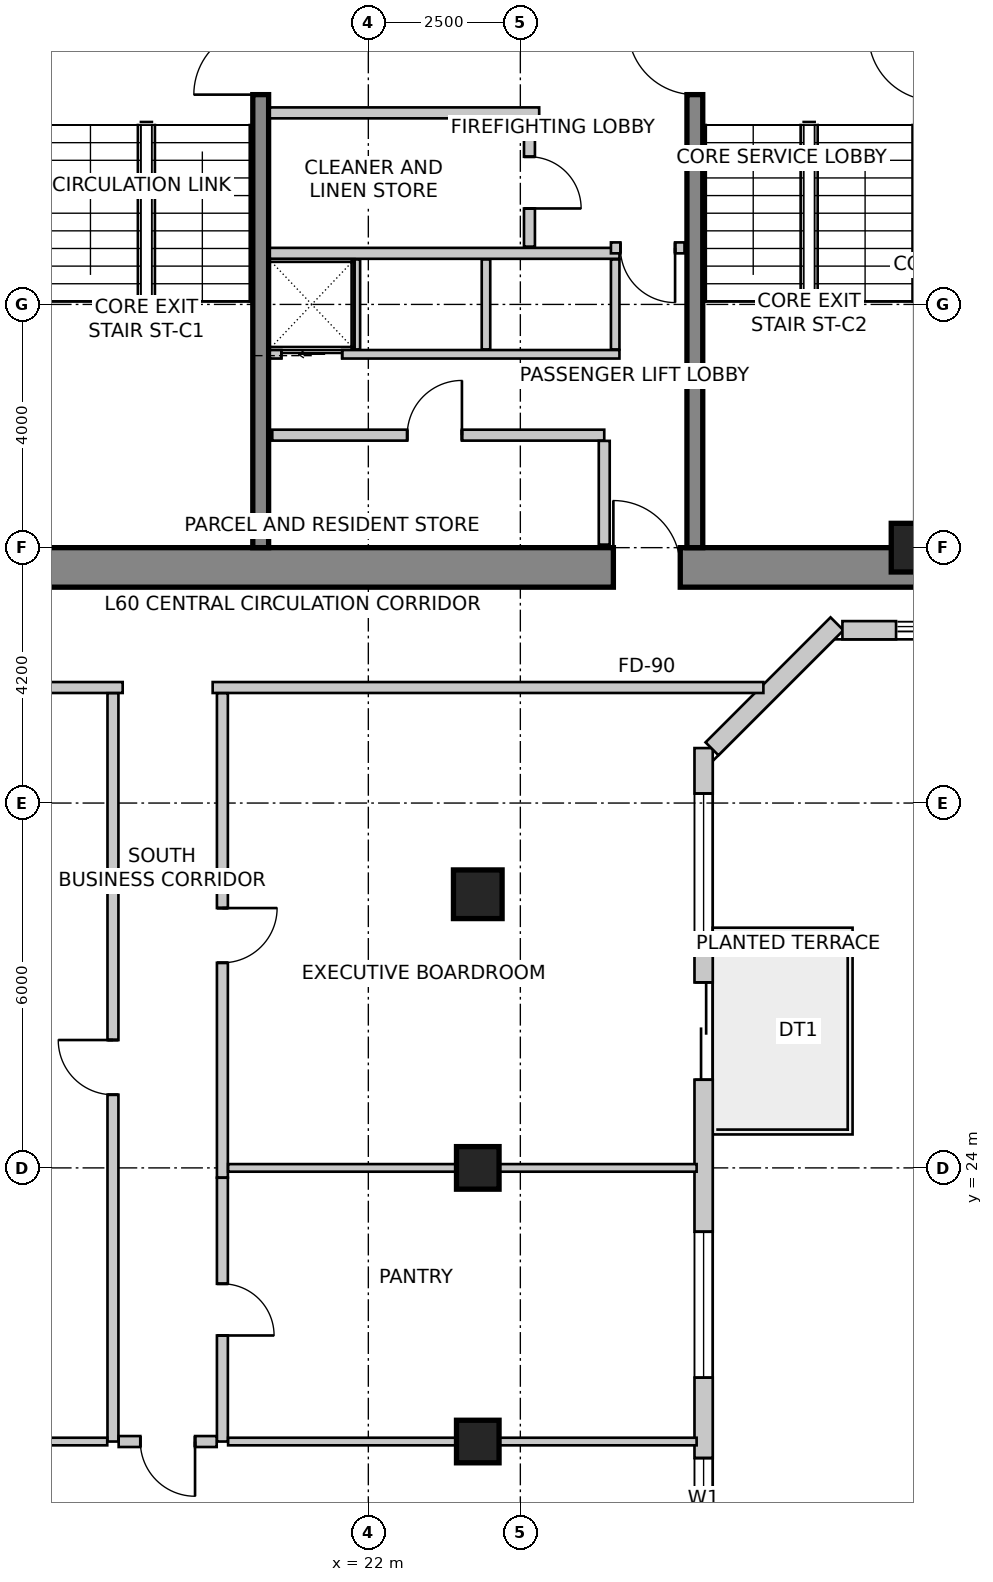
"""IFC4 building model, lengths in metres.
Left out: names, types, materials, properties, quantities, classifications, styles, units other than length and angle.
Written with IfcOpenShell. Run it as: python <this file> out.ifc"""

import sys

from ifc_helpers import new_model, si_unit, direction, frame, frame_2d, origin, origin_2d, place, context, subcontext, project, spatial, rectangle, extrude, source, transform, mapped, element, fill, save


model = new_model("IFC4")
c1 = context("Model", 3, precision=1e-05, world=origin(), true_north=direction((0.0, 1.0)))
c2 = subcontext(c1, "Body", "Model", "MODEL_VIEW")
j1 = project(units=[si_unit("LENGTHUNIT", "METRE"), si_unit("PLANEANGLEUNIT", "RADIAN")], contexts=[c1])
p1 = place(None, origin())
s1 = spatial("IfcSite", under=j1, at=p1, CompositionType="ELEMENT")
p2 = place(p1, origin())
s2 = spatial("IfcBuilding", under=s1, at=p2, CompositionType="ELEMENT")
p3 = place(p2, frame((0.0, 0.0, 235.9)))
s3 = spatial("IfcBuildingStorey", under=s2, at=p3, CompositionType="ELEMENT", Elevation=235.9)
p4 = place(p3, frame((15.95, 33.875, 0.0), z_axis=(0.0, 0.0, 1.0), x_axis=(1.0, 0.0, 0.0)))
e1 = element("IfcWall", 1, at=p4, inside=s3, PredefinedType="SHEAR", context=c2, shape_type="SweptSolid", body=[
    extrude(rectangle(XDim=15.7, YDim=0.65, at=frame_2d((7.85, 0.0))), origin(), (0.0, 0.0, 1.0), 3.5),
])
m1 = source(origin(), c2, "Body", "SweptSolid", [
    extrude(rectangle(XDim=1.1, YDim=2.15, at=frame_2d((0.55, 1.075))), frame((0.0, 0.335, 0.0), z_axis=(0.0, -1.0, 0.0), x_axis=(1.0, 0.0, 0.0)), (0.0, 0.0, 1.0), 0.67),
])
p5 = place(p4, frame((10.08, 0.0, 0.0)))
e2 = element("IfcOpeningElement", 2, at=p5, cuts=e1, PredefinedType="OPENING", context=c2, shape_type="MappedRepresentation", body=[
    mapped(m1, transform((0.0, 0.0, 0.0), scale=1.0)),
])
p6 = place(p3, frame((20.23, 34.2, 0.0), z_axis=(0.0, 0.0, 1.0), x_axis=(0.0, 1.0, 0.0)))
e3 = element("IfcWall", 3, at=p6, inside=s3, PredefinedType="SHEAR", context=c2, shape_type="SweptSolid", body=[
    extrude(rectangle(XDim=9.06, YDim=0.26, at=frame_2d((4.53, 0.0))), origin(), (0.0, 0.0, 1.0), 3.5),
])
m2 = source(origin(), c2, "Body", "SweptSolid", [
    extrude(rectangle(XDim=1.1, YDim=2.15, at=frame_2d((0.55, 1.075))), frame((0.0, 0.14, 0.0), z_axis=(0.0, -1.0, 0.0), x_axis=(1.0, 0.0, 0.0)), (0.0, 0.0, 1.0), 0.28),
])
p7 = place(p6, frame((7.45, 0.0, 0.0)))
e4 = element("IfcOpeningElement", 4, at=p7, cuts=e3, PredefinedType="OPENING", context=c2, shape_type="MappedRepresentation", body=[
    mapped(m2, transform((0.0, 0.0, 0.0), scale=1.0)),
])
p8 = place(p3, frame((27.37, 34.2, 0.0), z_axis=(0.0, 0.0, 1.0), x_axis=(0.0, 1.0, 0.0)))
e5 = element("IfcWall", 5, at=p8, inside=s3, PredefinedType="SHEAR", context=c2, shape_type="SweptSolid", body=[
    extrude(rectangle(XDim=9.06, YDim=0.26, at=frame_2d((4.53, 0.0))), origin(), (0.0, 0.0, 1.0), 3.5),
])
p9 = place(p8, frame((7.45, 0.0, 0.0)))
e6 = element("IfcOpeningElement", 6, at=p9, cuts=e5, PredefinedType="OPENING", context=c2, shape_type="MappedRepresentation", body=[
    mapped(m2, transform((0.0, 0.0, 0.0), scale=1.0)),
])
m3 = source(origin(), c2, "Body", "SweptSolid", [
    extrude(rectangle(XDim=0.8, YDim=0.8, at=origin_2d()), origin(), (0.0, 0.0, 1.0), 3.5),
])
for number, where, z_axis, x_axis in (
    (7, (31.0, 34.2, 0.0), (0.0, 0.0, 1.0), (1.0, 0.0, 0.0)),
    (8, (23.8, 28.5, 0.0), (0.0, 0.0, 1.0), (1.0, 0.0, 0.0)),
):
    element("IfcColumn", number, at=place(p3, frame(where, z_axis=z_axis, x_axis=x_axis)), inside=s3, PredefinedType="COLUMN", context=c2, shape_type="MappedRepresentation", body=[
        mapped(m3, transform((0.0, 0.0, 0.0), scale=1.0)),
    ])
m4 = source(origin(), c2, "Body", "SweptSolid", [
    extrude(rectangle(XDim=0.7, YDim=0.7, at=origin_2d()), origin(), (0.0, 0.0, 1.0), 3.5),
])
for number, where, z_axis, x_axis in (
    (9, (23.8, 24.0, 0.0), (0.0, 0.0, 1.0), (1.0, 0.0, 0.0)),
    (10, (23.8, 19.5, 0.0), (0.0, 0.0, 1.0), (1.0, 0.0, 0.0)),
):
    element("IfcColumn", number, at=place(p3, frame(where, z_axis=z_axis, x_axis=x_axis)), inside=s3, PredefinedType="COLUMN", context=c2, shape_type="MappedRepresentation", body=[
        mapped(m4, transform((0.0, 0.0, 0.0), scale=1.0)),
    ])
p10 = place(p3, frame((27.514, 16.457, 0.0), z_axis=(0.0, 0.0, 1.0), x_axis=(0.0, 1.0, 0.0)))
e11 = element("IfcWall", 11, at=p10, inside=s3, PredefinedType="SOLIDWALL", context=c2, shape_type="SweptSolid", body=[
    extrude(rectangle(XDim=14.447, YDim=0.3, at=frame_2d((7.223, 0.0))), origin(), (0.0, 0.0, 1.0), 3.25),
])
m5 = source(origin(), c2, "Body", "SweptSolid", [
    extrude(rectangle(XDim=1.6, YDim=2.15, at=frame_2d((0.8, 1.075))), frame((0.0, 0.16, 0.0), z_axis=(0.0, -1.0, 0.0), x_axis=(1.0, 0.0, 0.0)), (0.0, 0.0, 1.0), 0.32),
])
p11 = place(p10, frame((8.993, 0.0, 0.0)))
e12 = element("IfcOpeningElement", 12, at=p11, cuts=e11, PredefinedType="OPENING", context=c2, shape_type="MappedRepresentation", body=[
    mapped(m5, transform((0.0, 0.0, 0.0), scale=1.0)),
])
m6 = source(origin(), c2, "Body", "SweptSolid", [
    extrude(rectangle(XDim=2.4, YDim=2.2, at=frame_2d((1.2, 1.1))), frame((0.0, 0.16, 0.0), z_axis=(0.0, -1.0, 0.0), x_axis=(1.0, 0.0, 0.0)), (0.0, 0.0, 1.0), 0.32),
])
p12 = place(p10, frame((0.371, 0.0, 0.85)))
e13 = element("IfcOpeningElement", 13, at=p12, cuts=e11, PredefinedType="OPENING", context=c2, shape_type="MappedRepresentation", body=[
    mapped(m6, transform((0.0, 0.0, 0.0), scale=1.0)),
])
p13 = place(p10, frame((4.093, 0.0, 0.85)))
e14 = element("IfcOpeningElement", 14, at=p13, cuts=e11, PredefinedType="OPENING", context=c2, shape_type="MappedRepresentation", body=[
    mapped(m6, transform((0.0, 0.0, 0.0), scale=1.0)),
])
p14 = place(p10, frame((11.3, 0.0, 0.85)))
e15 = element("IfcOpeningElement", 15, at=p14, cuts=e11, PredefinedType="OPENING", context=c2, shape_type="MappedRepresentation", body=[
    mapped(m6, transform((0.0, 0.0, 0.0), scale=1.0)),
])
p15 = place(p3, frame((27.652, 30.892, 0.0), z_axis=(0.0, 0.0, 1.0), x_axis=(0.707106781187, 0.707106781187, 0.0)))
e16 = element("IfcWall", 16, at=p15, inside=s3, PredefinedType="SOLIDWALL", context=c2, shape_type="SweptSolid", body=[
    extrude(rectangle(XDim=2.907, YDim=0.3, at=frame_2d((1.454, 0.0))), origin(), (0.0, 0.0, 1.0), 3.25),
])
p16 = place(p3, frame((29.797, 32.842, 0.0), z_axis=(0.0, 0.0, 1.0), x_axis=(1.0, 0.0, 0.0)))
e17 = element("IfcWall", 17, at=p16, inside=s3, PredefinedType="SOLIDWALL", context=c2, shape_type="SweptSolid", body=[
    extrude(rectangle(XDim=0.882, YDim=0.3, at=frame_2d((0.441, 0.0))), origin(), (0.0, 0.0, 1.0), 3.25),
])
p17 = place(p3, frame((20.38, 37.38, 0.0), z_axis=(0.0, 0.0, 1.0), x_axis=(1.0, 0.0, 0.0)))
e18 = element("IfcWall", 18, at=p17, inside=s3, PredefinedType="SOLIDWALL", context=c2, shape_type="SweptSolid", body=[
    extrude(rectangle(XDim=5.75, YDim=0.14, at=frame_2d((2.875, 0.0))), origin(), (0.0, 0.0, 1.0), 3.25),
])
m7 = source(origin(), c2, "Body", "SweptSolid", [
    extrude(rectangle(XDim=1.0, YDim=2.15, at=frame_2d((0.5, 1.075))), frame((0.0, 0.08, 0.0), z_axis=(0.0, -1.0, 0.0), x_axis=(1.0, 0.0, 0.0)), (0.0, 0.0, 1.0), 0.16),
])
p18 = place(p17, frame((0.19, 0.0, 0.0)))
e19 = element("IfcOpeningElement", 19, at=p18, cuts=e18, PredefinedType="OPENING", context=c2, shape_type="MappedRepresentation", body=[
    mapped(m7, transform((0.0, 0.0, 0.0), scale=1.0)),
])
p19 = place(p3, frame((20.38, 39.04, 0.0), z_axis=(0.0, 0.0, 1.0), x_axis=(1.0, 0.0, 0.0)))
e20 = element("IfcWall", 20, at=p19, inside=s3, PredefinedType="SOLIDWALL", context=c2, shape_type="SweptSolid", body=[
    extrude(rectangle(XDim=5.75, YDim=0.18, at=frame_2d((2.875, 0.0))), origin(), (0.0, 0.0, 1.0), 3.25),
])
for number, where, z_axis, x_axis in (
    (21, (26.06, 37.46, 0.0), (0.0, 0.0, 1.0), (0.0, 1.0, 0.0)),
    (22, (21.795, 37.46, 0.0), (0.0, 0.0, 1.0), (0.0, 1.0, 0.0)),
    (23, (23.935, 37.46, 0.0), (0.0, 0.0, 1.0), (0.0, 1.0, 0.0)),
):
    element("IfcWall", number, at=place(p3, frame(where, z_axis=z_axis, x_axis=x_axis)), inside=s3, PredefinedType="SOLIDWALL", context=c2, shape_type="SweptSolid", body=[
        extrude(rectangle(XDim=1.48, YDim=0.14, at=frame_2d((0.74, 0.0))), origin(), (0.0, 0.0, 1.0), 3.25),
    ])
p20 = place(p3, frame((24.81, 41.35, 0.0), z_axis=(0.0, 0.0, 1.0), x_axis=(-1.0, 0.0, 0.0)))
e24 = element("IfcWall", 24, at=p20, inside=s3, PredefinedType="PARTITIONING", context=c2, shape_type="SweptSolid", body=[
    extrude(rectangle(XDim=4.43, YDim=0.18, at=frame_2d((2.215, 0.0))), origin(), (0.0, 0.0, 1.0), 3.25),
])
p21 = place(p3, frame((24.65, 41.256, 0.0), z_axis=(0.0, 0.0, 1.0), x_axis=(0.0, -1.0, 0.0)))
e25 = element("IfcWall", 25, at=p21, inside=s3, PredefinedType="PARTITIONING", context=c2, shape_type="SweptSolid", body=[
    extrude(rectangle(XDim=2.106, YDim=0.18, at=frame_2d((1.053, 0.0))), origin(), (0.0, 0.0, 1.0), 3.25),
])
m8 = source(origin(), c2, "Body", "SweptSolid", [
    extrude(rectangle(XDim=0.85, YDim=2.15, at=frame_2d((0.425, 1.075))), frame((0.0, 0.1, 0.0), z_axis=(0.0, -1.0, 0.0), x_axis=(1.0, 0.0, 0.0)), (0.0, 0.0, 1.0), 0.2),
])
p22 = place(p21, frame((0.628, 0.0, 0.0)))
e26 = element("IfcOpeningElement", 26, at=p22, cuts=e25, PredefinedType="OPENING", context=c2, shape_type="MappedRepresentation", body=[
    mapped(m8, transform((0.0, 0.0, 0.0), scale=1.0)),
])
p23 = place(p3, frame((27.2, 39.13, 0.0), z_axis=(0.0, 0.0, 1.0), x_axis=(-1.0, 0.0, 0.0)))
e27 = element("IfcWall", 27, at=p23, inside=s3, PredefinedType="PARTITIONING", context=c2, shape_type="SweptSolid", body=[
    extrude(rectangle(XDim=1.21, YDim=0.18, at=frame_2d((0.605, 0.0))), origin(), (0.0, 0.0, 1.0), 3.25),
])
m9 = source(origin(), c2, "Body", "SweptSolid", [
    extrude(rectangle(XDim=0.9, YDim=2.15, at=frame_2d((0.45, 1.075))), frame((0.0, 0.1, 0.0), z_axis=(0.0, -1.0, 0.0), x_axis=(1.0, 0.0, 0.0)), (0.0, 0.0, 1.0), 0.2),
])
p24 = place(p23, frame((0.155, 0.0, 0.0)))
e28 = element("IfcOpeningElement", 28, at=p24, cuts=e27, PredefinedType="OPENING", context=c2, shape_type="MappedRepresentation", body=[
    mapped(m9, transform((0.0, 0.0, 0.0), scale=1.0)),
])
p25 = place(p3, frame((20.42, 36.05, 0.0), z_axis=(0.0, 0.0, 1.0), x_axis=(1.0, 0.0, 0.0)))
e29 = element("IfcWall", 29, at=p25, inside=s3, PredefinedType="PARTITIONING", context=c2, shape_type="SweptSolid", body=[
    extrude(rectangle(XDim=5.46, YDim=0.18, at=frame_2d((2.73, 0.0))), origin(), (0.0, 0.0, 1.0), 3.25),
])
p26 = place(p25, frame((2.219, 0.0, 0.0)))
e30 = element("IfcOpeningElement", 30, at=p26, cuts=e29, PredefinedType="OPENING", context=c2, shape_type="MappedRepresentation", body=[
    mapped(m9, transform((0.0, 0.0, 0.0), scale=1.0)),
])
p27 = place(p3, frame((25.88, 35.956, 0.0), z_axis=(0.0, 0.0, 1.0), x_axis=(0.0, -1.0, 0.0)))
e31 = element("IfcWall", 31, at=p27, inside=s3, PredefinedType="PARTITIONING", context=c2, shape_type="SweptSolid", body=[
    extrude(rectangle(XDim=1.706, YDim=0.18, at=frame_2d((0.853, 0.0))), origin(), (0.0, 0.0, 1.0), 2.542),
])
p28 = place(p3, frame((17.96, 31.9, 0.0), z_axis=(0.0, 0.0, 1.0), x_axis=(-1.0, 0.0, 0.0)))
e32 = element("IfcWall", 32, at=p28, inside=s3, PredefinedType="PARTITIONING", context=c2, shape_type="SweptSolid", body=[
    extrude(rectangle(XDim=5.366, YDim=0.18, at=frame_2d((2.683, 0.0))), origin(), (0.0, 0.0, 1.0), 2.835),
])
p29 = place(p3, frame((28.497, 31.9, 0.0), z_axis=(0.0, 0.0, 1.0), x_axis=(-1.0, 0.0, 0.0)))
e33 = element("IfcWall", 33, at=p29, inside=s3, PredefinedType="PARTITIONING", context=c2, shape_type="SweptSolid", body=[
    extrude(rectangle(XDim=9.057, YDim=0.18, at=frame_2d((4.529, 0.0))), origin(), (0.0, 0.0, 1.0), 2.835),
])
p30 = place(p3, frame((17.8, 19.5, 0.0), z_axis=(0.0, 0.0, 1.0), x_axis=(0.0, 1.0, 0.0)))
e34 = element("IfcWall", 34, at=p30, inside=s3, PredefinedType="PARTITIONING", context=c2, shape_type="SweptSolid", body=[
    extrude(rectangle(XDim=12.306, YDim=0.18, at=frame_2d((6.153, 0.0))), origin(), (0.0, 0.0, 1.0), 2.688),
])
p31 = place(p30, frame((5.703, 0.0, 0.0)))
e35 = element("IfcOpeningElement", 35, at=p31, cuts=e34, PredefinedType="OPENING", context=c2, shape_type="MappedRepresentation", body=[
    mapped(m9, transform((0.0, 0.0, 0.0), scale=1.0)),
])
p32 = place(p3, frame((19.6, 31.806, 0.0), z_axis=(0.0, 0.0, 1.0), x_axis=(0.0, -1.0, 0.0)))
e36 = element("IfcWall", 36, at=p32, inside=s3, PredefinedType="PARTITIONING", context=c2, shape_type="SweptSolid", body=[
    extrude(rectangle(XDim=7.966, YDim=0.18, at=frame_2d((3.983, 0.0))), origin(), (0.0, 0.0, 1.0), 2.688),
])
p33 = place(p32, frame((3.533, 0.0, 0.0)))
e37 = element("IfcOpeningElement", 37, at=p33, cuts=e36, PredefinedType="OPENING", context=c2, shape_type="MappedRepresentation", body=[
    mapped(m9, transform((0.0, 0.0, 0.0), scale=1.0)),
])
p34 = place(p3, frame((19.6, 23.838, 0.0), z_axis=(0.0, 0.0, 1.0), x_axis=(0.0, -1.0, 0.0)))
e38 = element("IfcWall", 38, at=p34, inside=s3, PredefinedType="PARTITIONING", context=c2, shape_type="SweptSolid", body=[
    extrude(rectangle(XDim=4.338, YDim=0.18, at=frame_2d((2.169, 0.0))), origin(), (0.0, 0.0, 1.0), 2.688),
])
p35 = place(p34, frame((1.744, 0.0, 0.0)))
e39 = element("IfcOpeningElement", 39, at=p35, cuts=e38, PredefinedType="OPENING", context=c2, shape_type="MappedRepresentation", body=[
    mapped(m8, transform((0.0, 0.0, 0.0), scale=1.0)),
])
p36 = place(p3, frame((19.506, 19.5, 0.0), z_axis=(0.0, 0.0, 1.0), x_axis=(-1.0, 0.0, 0.0)))
e40 = element("IfcWall", 40, at=p36, inside=s3, PredefinedType="PARTITIONING", context=c2, shape_type="SweptSolid", body=[
    extrude(rectangle(XDim=1.612, YDim=0.18, at=frame_2d((0.806, 0.0))), origin(), (0.0, 0.0, 1.0), 3.25),
])
p37 = place(p36, frame((0.356, 0.0, 0.0)))
e41 = element("IfcOpeningElement", 41, at=p37, cuts=e40, PredefinedType="OPENING", context=c2, shape_type="MappedRepresentation", body=[
    mapped(m9, transform((0.0, 0.0, 0.0), scale=1.0)),
])
p38 = place(p3, frame((17.706, 19.5, 0.0), z_axis=(0.0, 0.0, 1.0), x_axis=(-1.0, 0.0, 0.0)))
e42 = element("IfcWall", 42, at=p38, inside=s3, PredefinedType="PARTITIONING", context=c2, shape_type="SweptSolid", body=[
    extrude(rectangle(XDim=6.853, YDim=0.125, at=frame_2d((3.427, 0.0))), origin(), (0.0, 0.0, 1.0), 3.25),
])
for number, where, z_axis, x_axis in (
    (43, (27.399, 24.0, 0.0), (0.0, 0.0, 1.0), (-1.0, 0.0, 0.0)),
    (44, (27.399, 19.5, 0.0), (0.0, 0.0, 1.0), (-1.0, 0.0, 0.0)),
):
    element("IfcWall", number, at=place(p3, frame(where, z_axis=z_axis, x_axis=x_axis)), inside=s3, PredefinedType="PARTITIONING", context=c2, shape_type="SweptSolid", body=[
        extrude(rectangle(XDim=7.705, YDim=0.125, at=frame_2d((3.853, 0.0))), origin(), (0.0, 0.0, 1.0), 2.542),
    ])
m10 = source(origin(), c2, "Body", "SweptSolid", [
    extrude(rectangle(XDim=1.6, YDim=2.15, at=frame_2d((0.8, 1.075))), frame((0.0, 0.025, 0.0), z_axis=(0.0, -1.0, 0.0), x_axis=(1.0, 0.0, 0.0)), (0.0, 0.0, 1.0), 0.05),
])
p39 = place(p11, origin())
e45 = element("IfcDoor", 45, at=p39, inside=s3, OperationType="DOUBLE_DOOR_SLIDING", PredefinedType="DOOR", context=c2, shape_type="MappedRepresentation", body=[
    mapped(m10, transform((0.0, 0.0, 0.0), scale=1.0)),
])
fill(e12, e45)
m11 = source(origin(), c2, "Body", "SweptSolid", [
    extrude(rectangle(XDim=2.4, YDim=2.2, at=frame_2d((1.2, 1.1))), frame((0.0, -0.015, 0.0), z_axis=(0.0, -1.0, 0.0), x_axis=(1.0, 0.0, 0.0)), (0.0, 0.0, 1.0), 0.06),
])
p40 = place(p12, origin())
e46 = element("IfcWindow", 46, at=p40, inside=s3, PartitioningType="SINGLE_PANEL", PredefinedType="WINDOW", context=c2, shape_type="MappedRepresentation", body=[
    mapped(m11, transform((0.0, 0.0, 0.0), scale=1.0)),
])
fill(e13, e46)
p41 = place(p13, origin())
e47 = element("IfcWindow", 47, at=p41, inside=s3, PartitioningType="SINGLE_PANEL", PredefinedType="WINDOW", context=c2, shape_type="MappedRepresentation", body=[
    mapped(m11, transform((0.0, 0.0, 0.0), scale=1.0)),
])
fill(e14, e47)
p42 = place(p14, origin())
e48 = element("IfcWindow", 48, at=p42, inside=s3, PartitioningType="SINGLE_PANEL", PredefinedType="WINDOW", context=c2, shape_type="MappedRepresentation", body=[
    mapped(m11, transform((0.0, 0.0, 0.0), scale=1.0)),
])
fill(e15, e48)
m12 = source(origin(), c2, "Body", "SweptSolid", [
    extrude(rectangle(XDim=1.0, YDim=2.15, at=frame_2d((0.5, 1.075))), frame((0.0, 0.025, 0.0), z_axis=(0.0, -1.0, 0.0), x_axis=(1.0, 0.0, 0.0)), (0.0, 0.0, 1.0), 0.05),
])
p43 = place(p18, origin())
e49 = element("IfcDoor", 49, at=p43, inside=s3, OperationType="SLIDING_TO_LEFT", PredefinedType="DOOR", context=c2, shape_type="MappedRepresentation", body=[
    mapped(m12, transform((0.0, 0.0, 0.0), scale=1.0)),
])
fill(e19, e49)
m13 = source(origin(), c2, "Body", "SweptSolid", [
    extrude(rectangle(XDim=1.1, YDim=2.15, at=frame_2d((0.55, 1.075))), frame((0.0, 0.025, 0.0), z_axis=(0.0, -1.0, 0.0), x_axis=(1.0, 0.0, 0.0)), (0.0, 0.0, 1.0), 0.05),
])
p44 = place(p7, origin())
e50 = element("IfcDoor", 50, at=p44, inside=s3, OperationType="SINGLE_SWING_LEFT", PredefinedType="DOOR", context=c2, shape_type="MappedRepresentation", body=[
    mapped(m13, transform((0.0, 0.0, 0.0), scale=1.0)),
])
fill(e4, e50)
p45 = place(p9, origin())
e51 = element("IfcDoor", 51, at=p45, inside=s3, OperationType="SINGLE_SWING_RIGHT", PredefinedType="DOOR", context=c2, shape_type="MappedRepresentation", body=[
    mapped(m13, transform((0.0, 0.0, 0.0), scale=1.0)),
])
fill(e6, e51)
p46 = place(p5, origin())
e52 = element("IfcDoor", 52, at=p46, inside=s3, OperationType="SINGLE_SWING_LEFT", PredefinedType="DOOR", context=c2, shape_type="MappedRepresentation", body=[
    mapped(m13, transform((0.0, 0.0, 0.0), scale=1.0)),
])
fill(e2, e52)
m14 = source(origin(), c2, "Body", "SweptSolid", [
    extrude(rectangle(XDim=0.85, YDim=2.15, at=frame_2d((0.425, 1.075))), frame((0.0, 0.025, 0.0), z_axis=(0.0, -1.0, 0.0), x_axis=(1.0, 0.0, 0.0)), (0.0, 0.0, 1.0), 0.05),
])
p47 = place(p22, origin())
e53 = element("IfcDoor", 53, at=p47, inside=s3, OperationType="SINGLE_SWING_RIGHT", PredefinedType="DOOR", context=c2, shape_type="MappedRepresentation", body=[
    mapped(m14, transform((0.0, 0.0, 0.0), scale=1.0)),
])
fill(e26, e53)
m15 = source(origin(), c2, "Body", "SweptSolid", [
    extrude(rectangle(XDim=0.9, YDim=2.15, at=frame_2d((0.45, 1.075))), frame((0.0, 0.025, 0.0), z_axis=(0.0, -1.0, 0.0), x_axis=(1.0, 0.0, 0.0)), (0.0, 0.0, 1.0), 0.05),
])
p48 = place(p24, origin())
e54 = element("IfcDoor", 54, at=p48, inside=s3, OperationType="SINGLE_SWING_LEFT", PredefinedType="DOOR", context=c2, shape_type="MappedRepresentation", body=[
    mapped(m15, transform((0.0, 0.0, 0.0), scale=1.0)),
])
fill(e28, e54)
p49 = place(p26, origin())
e55 = element("IfcDoor", 55, at=p49, inside=s3, OperationType="SINGLE_SWING_RIGHT", PredefinedType="DOOR", context=c2, shape_type="MappedRepresentation", body=[
    mapped(m15, transform((0.0, 0.0, 0.0), scale=1.0)),
])
fill(e30, e55)
m16 = source(origin(), c2, "Body", "SweptSolid", [
    extrude(rectangle(XDim=0.9, YDim=2.15, at=frame_2d((0.45, 1.075))), frame((0.0, 0.025, 0.0), z_axis=(0.0, -1.0, 0.0), x_axis=(1.0, 0.0, 0.0)), (0.0, 0.0, 1.0), 0.05),
])
p50 = place(p31, origin())
e56 = element("IfcDoor", 56, at=p50, inside=s3, OperationType="SINGLE_SWING_RIGHT", PredefinedType="DOOR", context=c2, shape_type="MappedRepresentation", body=[
    mapped(m16, transform((0.0, 0.0, 0.0), scale=1.0)),
])
fill(e35, e56)
p51 = place(p33, origin())
e57 = element("IfcDoor", 57, at=p51, inside=s3, OperationType="SINGLE_SWING_LEFT", PredefinedType="DOOR", context=c2, shape_type="MappedRepresentation", body=[
    mapped(m16, transform((0.0, 0.0, 0.0), scale=1.0)),
])
fill(e37, e57)
m17 = source(origin(), c2, "Body", "SweptSolid", [
    extrude(rectangle(XDim=0.85, YDim=2.15, at=frame_2d((0.425, 1.075))), frame((0.0, 0.025, 0.0), z_axis=(0.0, -1.0, 0.0), x_axis=(1.0, 0.0, 0.0)), (0.0, 0.0, 1.0), 0.05),
])
p52 = place(p35, origin())
e58 = element("IfcDoor", 58, at=p52, inside=s3, OperationType="SINGLE_SWING_RIGHT", PredefinedType="DOOR", context=c2, shape_type="MappedRepresentation", body=[
    mapped(m17, transform((0.0, 0.0, 0.0), scale=1.0)),
])
fill(e39, e58)
p53 = place(p37, origin())
e59 = element("IfcDoor", 59, at=p53, inside=s3, OperationType="SINGLE_SWING_LEFT", PredefinedType="DOOR", context=c2, shape_type="MappedRepresentation", body=[
    mapped(m16, transform((0.0, 0.0, 0.0), scale=1.0)),
])
fill(e41, e59)
save(model, sys.argv[1])
